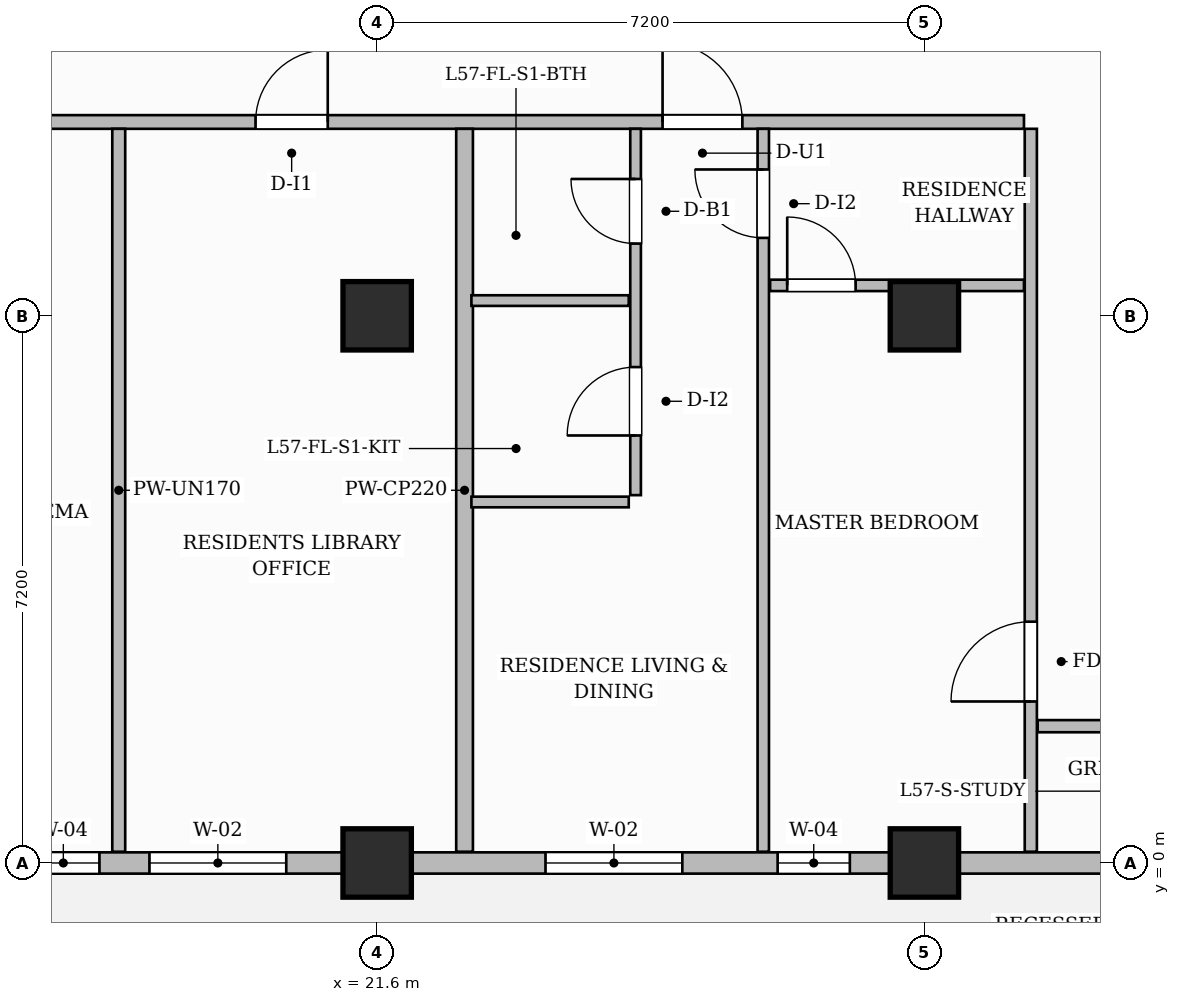
"""IFC4 building model, lengths in metres.
Left out: names, types, materials, properties, quantities, classifications, styles, units other than length and angle.
Written with IfcOpenShell. Run it as: python <this file> out.ifc"""

import sys

from ifc_helpers import new_model, si_unit, direction, frame, frame_2d, origin, origin_2d, place, context, subcontext, project, spatial, rectangle, extrude, source, transform, mapped, element, fill, save


model = new_model("IFC4")
c1 = context("Model", 3, precision=1e-05, world=origin(), true_north=direction((0.0, 1.0)))
c2 = subcontext(c1, "Body", "Model", "MODEL_VIEW")
j1 = project(units=[si_unit("LENGTHUNIT", "METRE"), si_unit("PLANEANGLEUNIT", "RADIAN")], contexts=[c1])
p1 = place(None, origin())
s1 = spatial("IfcSite", under=j1, at=p1, CompositionType="ELEMENT")
p2 = place(p1, origin())
s2 = spatial("IfcBuilding", under=s1, at=p2, CompositionType="ELEMENT")
p3 = place(p2, frame((0.0, 0.0, 228.85)))
s3 = spatial("IfcBuildingStorey", under=s2, at=p3, CompositionType="ELEMENT", Elevation=228.85)
m1 = source(origin(), c2, "Body", "SweptSolid", [
    extrude(rectangle(XDim=0.9, YDim=0.9, at=origin_2d()), origin(), (0.0, 0.0, 1.0), 3.85),
])
for number, where, z_axis, x_axis in (
    (1, (21.6, 0.0, 0.0), (0.0, 0.0, 1.0), (1.0, 0.0, 0.0)),
    (2, (21.6, 7.2, 0.0), (0.0, 0.0, 1.0), (1.0, 0.0, 0.0)),
    (3, (28.8, 0.0, 0.0), (0.0, 0.0, 1.0), (1.0, 0.0, 0.0)),
    (4, (28.8, 7.2, 0.0), (0.0, 0.0, 1.0), (1.0, 0.0, 0.0)),
):
    element("IfcColumn", number, at=place(p3, frame(where, z_axis=z_axis, x_axis=x_axis)), inside=s3, PredefinedType="COLUMN", context=c2, shape_type="MappedRepresentation", body=[
        mapped(m1, transform((0.0, 0.0, 0.0), scale=1.0)),
    ])
p4 = place(p3, frame((14.548, 9.75, 0.0), z_axis=(0.0, 0.0, 1.0), x_axis=(1.0, 0.0, 0.0)))
e5 = element("IfcWall", 5, at=p4, inside=s3, PredefinedType="PARTITIONING", context=c2, shape_type="SweptSolid", body=[
    extrude(rectangle(XDim=15.562, YDim=0.18, at=frame_2d((7.781, 0.0))), origin(), (0.0, 0.0, 1.0), 3.6),
])
p5 = place(p4, frame((1.052, 0.0, 0.0)))
e6 = element("IfcOpeningElement", 6, at=p5, cuts=e5, PredefinedType="OPENING", context=c2, shape_type="SweptSolid", body=[
    extrude(rectangle(XDim=1.4, YDim=2.35, at=frame_2d((0.7, 1.175))), frame((0.0, 0.1, 0.0), z_axis=(0.0, -1.0, 0.0), x_axis=(1.0, 0.0, 0.0)), (0.0, 0.0, 1.0), 0.2),
])
p6 = place(p4, frame((5.452, 0.0, 0.0)))
e7 = element("IfcOpeningElement", 7, at=p6, cuts=e5, PredefinedType="OPENING", context=c2, shape_type="SweptSolid", body=[
    extrude(rectangle(XDim=0.95, YDim=2.15, at=frame_2d((0.475, 1.075))), frame((0.0, 0.1, 0.0), z_axis=(0.0, -1.0, 0.0), x_axis=(1.0, 0.0, 0.0)), (0.0, 0.0, 1.0), 0.2),
])
p7 = place(p4, frame((10.807, 0.0, 0.0)))
e8 = element("IfcOpeningElement", 8, at=p7, cuts=e5, PredefinedType="OPENING", context=c2, shape_type="SweptSolid", body=[
    extrude(rectangle(XDim=1.05, YDim=2.25, at=frame_2d((0.525, 1.125))), frame((0.0, 0.1, 0.0), z_axis=(0.0, -1.0, 0.0), x_axis=(1.0, 0.0, 0.0)), (0.0, 0.0, 1.0), 0.2),
])
p8 = place(p3, frame((30.2, 0.148, 0.0), z_axis=(0.0, 0.0, 1.0), x_axis=(0.0, 1.0, 0.0)))
e9 = element("IfcWall", 9, at=p8, inside=s3, PredefinedType="PARTITIONING", context=c2, shape_type="SweptSolid", body=[
    extrude(rectangle(XDim=9.512, YDim=0.16, at=frame_2d((4.756, 0.0))), origin(), (0.0, 0.0, 1.0), 3.6),
])
p9 = place(p8, frame((1.977, 0.0, 0.0)))
e10 = element("IfcOpeningElement", 10, at=p9, cuts=e9, PredefinedType="OPENING", context=c2, shape_type="SweptSolid", body=[
    extrude(rectangle(XDim=1.05, YDim=2.15, at=frame_2d((0.525, 1.075))), frame((0.0, 0.09, 0.0), z_axis=(0.0, -1.0, 0.0), x_axis=(1.0, 0.0, 0.0)), (0.0, 0.0, 1.0), 0.18),
])
p10 = place(p3, frame((30.29, 1.8, 0.0), z_axis=(0.0, 0.0, 1.0), x_axis=(1.0, 0.0, 0.0)))
e11 = element("IfcWall", 11, at=p10, inside=s3, PredefinedType="PARTITIONING", context=c2, shape_type="SweptSolid", body=[
    extrude(rectangle(XDim=19.37, YDim=0.16, at=frame_2d((9.685, 0.0))), origin(), (0.0, 0.0, 1.0), 3.6),
])
p11 = place(p10, frame((5.074, 0.0, 0.0)))
e12 = element("IfcOpeningElement", 12, at=p11, cuts=e11, PredefinedType="OPENING", context=c2, shape_type="SweptSolid", body=[
    extrude(rectangle(XDim=0.9, YDim=2.15, at=frame_2d((0.45, 1.075))), frame((0.0, 0.09, 0.0), z_axis=(0.0, -1.0, 0.0), x_axis=(1.0, 0.0, 0.0)), (0.0, 0.0, 1.0), 0.18),
])
p12 = place(p10, frame((14.06, 0.0, 0.0)))
e13 = element("IfcOpeningElement", 13, at=p12, cuts=e11, PredefinedType="OPENING", context=c2, shape_type="SweptSolid", body=[
    extrude(rectangle(XDim=0.9, YDim=2.15, at=frame_2d((0.45, 1.075))), frame((0.0, 0.09, 0.0), z_axis=(0.0, -1.0, 0.0), x_axis=(1.0, 0.0, 0.0)), (0.0, 0.0, 1.0), 0.18),
])
p13 = place(p3, frame((18.2, 0.148, 0.0), z_axis=(0.0, 0.0, 1.0), x_axis=(0.0, 1.0, 0.0)))
e14 = element("IfcWall", 14, at=p13, inside=s3, PredefinedType="PARTITIONING", context=c2, shape_type="SweptSolid", body=[
    extrude(rectangle(XDim=9.512, YDim=0.17, at=frame_2d((4.756, 0.0))), origin(), (0.0, 0.0, 1.0), 3.315),
])
p14 = place(p3, frame((22.75, 0.148, 0.0), z_axis=(0.0, 0.0, 1.0), x_axis=(0.0, 1.0, 0.0)))
e15 = element("IfcWall", 15, at=p14, inside=s3, PredefinedType="PARTITIONING", context=c2, shape_type="SweptSolid", body=[
    extrude(rectangle(XDim=9.512, YDim=0.22, at=frame_2d((4.756, 0.0))), origin(), (0.0, 0.0, 1.0), 3.6),
])
p15 = place(p3, frame((25.0, 4.84, 0.0), z_axis=(0.0, 0.0, 1.0), x_axis=(0.0, 1.0, 0.0)))
e16 = element("IfcWall", 16, at=p15, inside=s3, PredefinedType="PARTITIONING", context=c2, shape_type="SweptSolid", body=[
    extrude(rectangle(XDim=4.82, YDim=0.14, at=frame_2d((2.41, 0.0))), origin(), (0.0, 0.0, 1.0), 3.315),
])
p16 = place(p15, frame((0.785, 0.0, 0.0)))
e17 = element("IfcOpeningElement", 17, at=p16, cuts=e16, PredefinedType="OPENING", context=c2, shape_type="SweptSolid", body=[
    extrude(rectangle(XDim=0.9, YDim=2.15, at=frame_2d((0.45, 1.075))), frame((0.0, 0.08, 0.0), z_axis=(0.0, -1.0, 0.0), x_axis=(1.0, 0.0, 0.0)), (0.0, 0.0, 1.0), 0.16),
])
p17 = place(p15, frame((3.31, 0.0, 0.0)))
e18 = element("IfcOpeningElement", 18, at=p17, cuts=e16, PredefinedType="OPENING", context=c2, shape_type="SweptSolid", body=[
    extrude(rectangle(XDim=0.85, YDim=2.1, at=frame_2d((0.425, 1.05))), frame((0.0, 0.08, 0.0), z_axis=(0.0, -1.0, 0.0), x_axis=(1.0, 0.0, 0.0)), (0.0, 0.0, 1.0), 0.16),
])
p18 = place(p3, frame((22.84, 7.4, 0.0), z_axis=(0.0, 0.0, 1.0), x_axis=(1.0, 0.0, 0.0)))
e19 = element("IfcWall", 19, at=p18, inside=s3, PredefinedType="PARTITIONING", context=c2, shape_type="SweptSolid", body=[
    extrude(rectangle(XDim=2.07, YDim=0.14, at=frame_2d((1.035, 0.0))), origin(), (0.0, 0.0, 1.0), 3.135),
])
p19 = place(p3, frame((22.84, 4.75, 0.0), z_axis=(0.0, 0.0, 1.0), x_axis=(1.0, 0.0, 0.0)))
e20 = element("IfcWall", 20, at=p19, inside=s3, PredefinedType="PARTITIONING", context=c2, shape_type="SweptSolid", body=[
    extrude(rectangle(XDim=2.07, YDim=0.14, at=frame_2d((1.035, 0.0))), origin(), (0.0, 0.0, 1.0), 3.6),
])
p20 = place(p3, frame((26.68, 0.148, 0.0), z_axis=(0.0, 0.0, 1.0), x_axis=(0.0, 1.0, 0.0)))
e21 = element("IfcWall", 21, at=p20, inside=s3, PredefinedType="PARTITIONING", context=c2, shape_type="SweptSolid", body=[
    extrude(rectangle(XDim=9.512, YDim=0.15, at=frame_2d((4.756, 0.0))), origin(), (0.0, 0.0, 1.0), 3.6),
])
p21 = place(p20, frame((8.077, 0.0, 0.0)))
e22 = element("IfcOpeningElement", 22, at=p21, cuts=e21, PredefinedType="OPENING", context=c2, shape_type="SweptSolid", body=[
    extrude(rectangle(XDim=0.9, YDim=2.15, at=frame_2d((0.45, 1.075))), frame((0.0, 0.085, 0.0), z_axis=(0.0, -1.0, 0.0), x_axis=(1.0, 0.0, 0.0)), (0.0, 0.0, 1.0), 0.17),
])
p22 = place(p3, frame((26.77, 7.6, 0.0), z_axis=(0.0, 0.0, 1.0), x_axis=(1.0, 0.0, 0.0)))
e23 = element("IfcWall", 23, at=p22, inside=s3, PredefinedType="PARTITIONING", context=c2, shape_type="SweptSolid", body=[
    extrude(rectangle(XDim=3.34, YDim=0.15, at=frame_2d((1.67, 0.0))), origin(), (0.0, 0.0, 1.0), 3.6),
])
p23 = place(p22, frame((0.225, 0.0, 0.0)))
e24 = element("IfcOpeningElement", 24, at=p23, cuts=e23, PredefinedType="OPENING", context=c2, shape_type="SweptSolid", body=[
    extrude(rectangle(XDim=0.9, YDim=2.15, at=frame_2d((0.45, 1.075))), frame((0.0, 0.085, 0.0), z_axis=(0.0, -1.0, 0.0), x_axis=(1.0, 0.0, 0.0)), (0.0, 0.0, 1.0), 0.17),
])
p24 = place(p3, frame((14.4, 0.0, 0.0), z_axis=(0.0, 0.0, 1.0), x_axis=(1.0, 0.0, 0.0)))
e25 = element("IfcWall", 25, at=p24, inside=s3, PredefinedType="SOLIDWALL", context=c2, shape_type="SweptSolid", body=[
    extrude(rectangle(XDim=35.4, YDim=0.28, at=frame_2d((17.7, 0.0))), origin(), (0.0, 0.0, 1.0), 3.135),
])
p25 = place(p24, frame((0.85, 0.0, 0.0)))
e26 = element("IfcOpeningElement", 26, at=p25, cuts=e25, PredefinedType="OPENING", context=c2, shape_type="SweptSolid", body=[
    extrude(rectangle(XDim=1.2, YDim=2.2, at=frame_2d((0.6, 1.1))), frame((0.0, 0.15, 0.0), z_axis=(0.0, -1.0, 0.0), x_axis=(1.0, 0.0, 0.0)), (0.0, 0.0, 1.0), 0.3),
])
p26 = place(p24, frame((2.596, 0.0, 0.8)))
e27 = element("IfcOpeningElement", 27, at=p26, cuts=e25, PredefinedType="OPENING", context=c2, shape_type="SweptSolid", body=[
    extrude(rectangle(XDim=0.95, YDim=1.75, at=frame_2d((0.475, 0.875))), frame((0.0, 0.15, 0.0), z_axis=(0.0, -1.0, 0.0), x_axis=(1.0, 0.0, 0.0)), (0.0, 0.0, 1.0), 0.3),
])
p27 = place(p24, frame((4.204, 0.0, 0.8)))
e28 = element("IfcOpeningElement", 28, at=p27, cuts=e25, PredefinedType="OPENING", context=c2, shape_type="SweptSolid", body=[
    extrude(rectangle(XDim=1.8, YDim=1.85, at=frame_2d((0.9, 0.925))), frame((0.0, 0.15, 0.0), z_axis=(0.0, -1.0, 0.0), x_axis=(1.0, 0.0, 0.0)), (0.0, 0.0, 1.0), 0.3),
])
p28 = place(p24, frame((9.415, 0.0, 0.8)))
e29 = element("IfcOpeningElement", 29, at=p28, cuts=e25, PredefinedType="OPENING", context=c2, shape_type="SweptSolid", body=[
    extrude(rectangle(XDim=1.8, YDim=1.85, at=frame_2d((0.9, 0.925))), frame((0.0, 0.15, 0.0), z_axis=(0.0, -1.0, 0.0), x_axis=(1.0, 0.0, 0.0)), (0.0, 0.0, 1.0), 0.3),
])
p29 = place(p24, frame((12.469, 0.0, 0.8)))
e30 = element("IfcOpeningElement", 30, at=p29, cuts=e25, PredefinedType="OPENING", context=c2, shape_type="SweptSolid", body=[
    extrude(rectangle(XDim=0.95, YDim=1.75, at=frame_2d((0.475, 0.875))), frame((0.0, 0.15, 0.0), z_axis=(0.0, -1.0, 0.0), x_axis=(1.0, 0.0, 0.0)), (0.0, 0.0, 1.0), 0.3),
])
p30 = place(p24, frame((16.804, 0.0, 0.8)))
e31 = element("IfcOpeningElement", 31, at=p30, cuts=e25, PredefinedType="OPENING", context=c2, shape_type="SweptSolid", body=[
    extrude(rectangle(XDim=1.8, YDim=1.85, at=frame_2d((0.9, 0.925))), frame((0.0, 0.15, 0.0), z_axis=(0.0, -1.0, 0.0), x_axis=(1.0, 0.0, 0.0)), (0.0, 0.0, 1.0), 0.3),
])
p31 = place(p24, frame((22.396, 0.0, 0.8)))
e32 = element("IfcOpeningElement", 32, at=p31, cuts=e25, PredefinedType="OPENING", context=c2, shape_type="SweptSolid", body=[
    extrude(rectangle(XDim=1.8, YDim=1.85, at=frame_2d((0.9, 0.925))), frame((0.0, 0.15, 0.0), z_axis=(0.0, -1.0, 0.0), x_axis=(1.0, 0.0, 0.0)), (0.0, 0.0, 1.0), 0.3),
])
p32 = place(p24, frame((25.629, 0.0, 0.8)))
e33 = element("IfcOpeningElement", 33, at=p32, cuts=e25, PredefinedType="OPENING", context=c2, shape_type="SweptSolid", body=[
    extrude(rectangle(XDim=0.95, YDim=1.75, at=frame_2d((0.475, 0.875))), frame((0.0, 0.15, 0.0), z_axis=(0.0, -1.0, 0.0), x_axis=(1.0, 0.0, 0.0)), (0.0, 0.0, 1.0), 0.3),
])
p33 = place(p24, frame((29.075, 0.0, 0.8)))
e34 = element("IfcOpeningElement", 34, at=p33, cuts=e25, PredefinedType="OPENING", context=c2, shape_type="SweptSolid", body=[
    extrude(rectangle(XDim=1.8, YDim=1.85, at=frame_2d((0.9, 0.925))), frame((0.0, 0.15, 0.0), z_axis=(0.0, -1.0, 0.0), x_axis=(1.0, 0.0, 0.0)), (0.0, 0.0, 1.0), 0.3),
])
p34 = place(p24, frame((32.125, 0.0, 0.8)))
e35 = element("IfcOpeningElement", 35, at=p34, cuts=e25, PredefinedType="OPENING", context=c2, shape_type="SweptSolid", body=[
    extrude(rectangle(XDim=1.8, YDim=1.85, at=frame_2d((0.9, 0.925))), frame((0.0, 0.15, 0.0), z_axis=(0.0, -1.0, 0.0), x_axis=(1.0, 0.0, 0.0)), (0.0, 0.0, 1.0), 0.3),
])
m2 = source(origin(), c2, "Body", "SweptSolid", [
    extrude(rectangle(XDim=1.05, YDim=2.15, at=frame_2d((0.525, 1.075))), frame((0.0, 0.025, 0.0), z_axis=(0.0, -1.0, 0.0), x_axis=(1.0, 0.0, 0.0)), (0.0, 0.0, 1.0), 0.05),
])
p35 = place(p9, origin())
e36 = element("IfcDoor", 36, at=p35, inside=s3, OperationType="SINGLE_SWING_LEFT", PredefinedType="DOOR", context=c2, shape_type="MappedRepresentation", body=[
    mapped(m2, transform((0.0, 0.0, 0.0), scale=1.0)),
])
fill(e10, e36)
m3 = source(origin(), c2, "Body", "SweptSolid", [
    extrude(rectangle(XDim=0.95, YDim=2.15, at=frame_2d((0.475, 1.075))), frame((0.0, 0.025, 0.0), z_axis=(0.0, -1.0, 0.0), x_axis=(1.0, 0.0, 0.0)), (0.0, 0.0, 1.0), 0.05),
])
p36 = place(p6, origin())
e37 = element("IfcDoor", 37, at=p36, inside=s3, OperationType="SINGLE_SWING_RIGHT", PredefinedType="DOOR", context=c2, shape_type="MappedRepresentation", body=[
    mapped(m3, transform((0.0, 0.0, 0.0), scale=1.0)),
])
fill(e7, e37)
m4 = source(origin(), c2, "Body", "SweptSolid", [
    extrude(rectangle(XDim=0.9, YDim=2.15, at=frame_2d((0.45, 1.075))), frame((0.0, 0.025, 0.0), z_axis=(0.0, -1.0, 0.0), x_axis=(1.0, 0.0, 0.0)), (0.0, 0.0, 1.0), 0.05),
])
p37 = place(p16, origin())
e38 = element("IfcDoor", 38, at=p37, inside=s3, OperationType="SINGLE_SWING_LEFT", PredefinedType="DOOR", context=c2, shape_type="MappedRepresentation", body=[
    mapped(m4, transform((0.0, 0.0, 0.0), scale=1.0)),
])
fill(e17, e38)
m5 = source(origin(), c2, "Body", "SweptSolid", [
    extrude(rectangle(XDim=0.85, YDim=2.1, at=frame_2d((0.425, 1.05))), frame((0.0, 0.025, 0.0), z_axis=(0.0, -1.0, 0.0), x_axis=(1.0, 0.0, 0.0)), (0.0, 0.0, 1.0), 0.05),
])
p38 = place(p17, origin())
e39 = element("IfcDoor", 39, at=p38, inside=s3, OperationType="SINGLE_SWING_RIGHT", PredefinedType="DOOR", context=c2, shape_type="MappedRepresentation", body=[
    mapped(m5, transform((0.0, 0.0, 0.0), scale=1.0)),
])
fill(e18, e39)
m6 = source(origin(), c2, "Body", "SweptSolid", [
    extrude(rectangle(XDim=1.05, YDim=2.25, at=frame_2d((0.525, 1.125))), frame((0.0, 0.025, 0.0), z_axis=(0.0, -1.0, 0.0), x_axis=(1.0, 0.0, 0.0)), (0.0, 0.0, 1.0), 0.05),
])
p39 = place(p7, origin())
e40 = element("IfcDoor", 40, at=p39, inside=s3, OperationType="SINGLE_SWING_LEFT", PredefinedType="DOOR", context=c2, shape_type="MappedRepresentation", body=[
    mapped(m6, transform((0.0, 0.0, 0.0), scale=1.0)),
])
fill(e8, e40)
p40 = place(p21, origin())
e41 = element("IfcDoor", 41, at=p40, inside=s3, OperationType="SINGLE_SWING_RIGHT", PredefinedType="DOOR", context=c2, shape_type="MappedRepresentation", body=[
    mapped(m4, transform((0.0, 0.0, 0.0), scale=1.0)),
])
fill(e22, e41)
p41 = place(p23, origin())
e42 = element("IfcDoor", 42, at=p41, inside=s3, OperationType="SINGLE_SWING_LEFT", PredefinedType="DOOR", context=c2, shape_type="MappedRepresentation", body=[
    mapped(m4, transform((0.0, 0.0, 0.0), scale=1.0)),
])
fill(e24, e42)
m7 = source(origin(), c2, "Body", "SweptSolid", [
    extrude(rectangle(XDim=0.95, YDim=1.75, at=frame_2d((0.475, 0.875))), frame((0.0, 0.03, 0.0), z_axis=(0.0, -1.0, 0.0), x_axis=(1.0, 0.0, 0.0)), (0.0, 0.0, 1.0), 0.06),
])
p42 = place(p26, origin())
e43 = element("IfcWindow", 43, at=p42, inside=s3, PartitioningType="SINGLE_PANEL", PredefinedType="WINDOW", context=c2, shape_type="MappedRepresentation", body=[
    mapped(m7, transform((0.0, 0.0, 0.0), scale=1.0)),
])
fill(e27, e43)
m8 = source(origin(), c2, "Body", "SweptSolid", [
    extrude(rectangle(XDim=1.8, YDim=1.85, at=frame_2d((0.9, 0.925))), frame((0.0, 0.03, 0.0), z_axis=(0.0, -1.0, 0.0), x_axis=(1.0, 0.0, 0.0)), (0.0, 0.0, 1.0), 0.06),
])
p43 = place(p27, origin())
e44 = element("IfcWindow", 44, at=p43, inside=s3, PartitioningType="DOUBLE_PANEL_VERTICAL", PredefinedType="WINDOW", context=c2, shape_type="MappedRepresentation", body=[
    mapped(m8, transform((0.0, 0.0, 0.0), scale=1.0)),
])
fill(e28, e44)
p44 = place(p28, origin())
e45 = element("IfcWindow", 45, at=p44, inside=s3, PartitioningType="DOUBLE_PANEL_VERTICAL", PredefinedType="WINDOW", context=c2, shape_type="MappedRepresentation", body=[
    mapped(m8, transform((0.0, 0.0, 0.0), scale=1.0)),
])
fill(e29, e45)
p45 = place(p29, origin())
e46 = element("IfcWindow", 46, at=p45, inside=s3, PartitioningType="SINGLE_PANEL", PredefinedType="WINDOW", context=c2, shape_type="MappedRepresentation", body=[
    mapped(m7, transform((0.0, 0.0, 0.0), scale=1.0)),
])
fill(e30, e46)
save(model, sys.argv[1])
